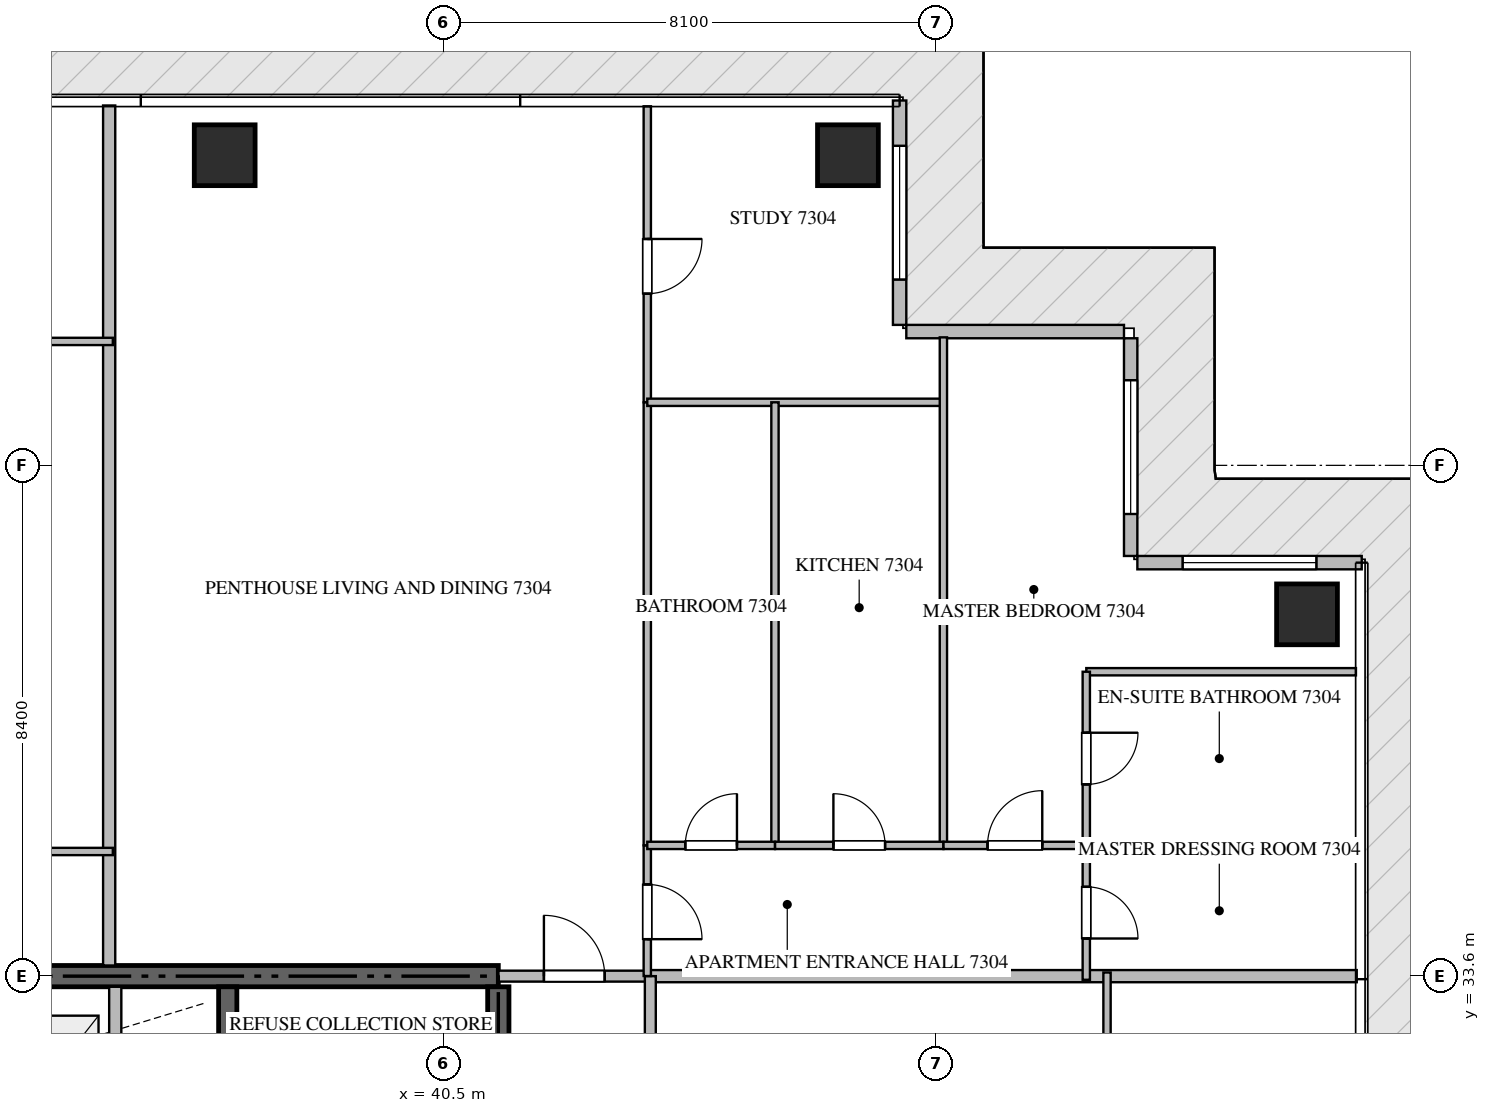
"""IFC4 building model, lengths in metres.
Left out: names, types, materials, properties, quantities, classifications, styles, units other than length and angle.
Written with IfcOpenShell. Run it as: python <this file> out.ifc"""

import sys

from ifc_helpers import new_model, si_unit, direction, frame, frame_2d, origin, origin_2d, place, context, subcontext, project, spatial, rectangle, extrude, source, transform, mapped, element, fill, save


model = new_model("IFC4")
c1 = context("Model", 3, precision=1e-05, world=origin(), true_north=direction((0.0, 1.0)))
c2 = subcontext(c1, "Body", "Model", "MODEL_VIEW")
j1 = project(units=[si_unit("LENGTHUNIT", "METRE"), si_unit("PLANEANGLEUNIT", "RADIAN")], contexts=[c1])
p1 = place(None, origin())
s1 = spatial("IfcSite", under=j1, at=p1, CompositionType="ELEMENT")
p2 = place(p1, origin())
s2 = spatial("IfcBuilding", under=s1, at=p2, CompositionType="ELEMENT")
p3 = place(p2, frame((0.0, 0.0, 293.45)))
s3 = spatial("IfcBuildingStorey", under=s2, at=p3, CompositionType="ELEMENT", Elevation=293.45)
p4 = place(p3, frame((41.4, 33.6, -0.26), z_axis=(0.0, 0.0, 1.0), x_axis=(-1.0, 0.0, 0.0)))
e1 = element("IfcWall", 1, at=p4, inside=s3, PredefinedType="SHEAR", context=c2, shape_type="SweptSolid", body=[
    extrude(rectangle(XDim=18.0, YDim=0.35, at=frame_2d((9.0, 0.0))), origin(), (0.0, 0.0, 1.0), 4.048),
])
p5 = place(p3, frame((41.4, 27.75, -0.26), z_axis=(0.0, 0.0, 1.0), x_axis=(0.0, 1.0, 0.0)))
e2 = element("IfcWall", 2, at=p5, inside=s3, PredefinedType="SHEAR", context=c2, shape_type="SweptSolid", body=[
    extrude(rectangle(XDim=5.675, YDim=0.35, at=frame_2d((2.837, 0.0))), origin(), (0.0, 0.0, 1.0), 4.048),
])
p6 = place(p3, frame((36.95, 27.05, -0.26), z_axis=(0.0, 0.0, 1.0), x_axis=(0.0, 1.0, 0.0)))
e3 = element("IfcWall", 3, at=p6, inside=s3, PredefinedType="SHEAR", context=c2, shape_type="SweptSolid", body=[
    extrude(rectangle(XDim=6.375, YDim=0.3, at=frame_2d((3.188, 0.0))), origin(), (0.0, 0.0, 1.0), 4.048),
])
m1 = source(origin(), c2, "Body", "SweptSolid", [
    extrude(rectangle(XDim=1.0, YDim=1.0, at=origin_2d()), origin(), (0.0, 0.0, 1.0), 4.05),
])
for number, where, z_axis, x_axis in (
    (4, (36.9, 47.1, -0.26), (0.0, 0.0, 1.0), (1.0, 0.0, 0.0)),
    (5, (47.15, 47.1, -0.26), (0.0, 0.0, 1.0), (1.0, 0.0, 0.0)),
    (6, (54.7, 39.55, -0.26), (0.0, 0.0, 1.0), (1.0, 0.0, 0.0)),
):
    element("IfcColumn", number, at=place(p3, frame(where, z_axis=z_axis, x_axis=x_axis)), inside=s3, PredefinedType="COLUMN", context=c2, shape_type="MappedRepresentation", body=[
        mapped(m1, transform((0.0, 0.0, 0.0), scale=1.0)),
    ])
p7 = place(p3, frame((55.6, 40.4, 0.0), z_axis=(0.0, 0.0, 1.0), x_axis=(-1.0, 0.0, 0.0)))
e7 = element("IfcWall", 7, at=p7, inside=s3, PredefinedType="ELEMENTEDWALL", context=c2, shape_type="SweptSolid", body=[
    extrude(rectangle(XDim=3.69, YDim=0.22, at=frame_2d((1.845, 0.0))), origin(), (0.0, 0.0, 1.0), 3.775),
])
p8 = place(p7, frame((0.745, 0.0, 0.65)))
e8 = element("IfcOpeningElement", 8, at=p8, cuts=e7, PredefinedType="OPENING", context=c2, shape_type="SweptSolid", body=[
    extrude(rectangle(XDim=2.2, YDim=2.4, at=frame_2d((1.1, 1.2))), frame((0.0, 0.12, 0.0), z_axis=(0.0, -1.0, 0.0), x_axis=(1.0, 0.0, 0.0)), (0.0, 0.0, 1.0), 0.24),
])
p9 = place(p3, frame((51.8, 40.51, 0.0), z_axis=(0.0, 0.0, 1.0), x_axis=(0.0, 1.0, 0.0)))
e9 = element("IfcWall", 9, at=p9, inside=s3, PredefinedType="ELEMENTEDWALL", context=c2, shape_type="SweptSolid", body=[
    extrude(rectangle(XDim=3.58, YDim=0.22, at=frame_2d((1.79, 0.0))), origin(), (0.0, 0.0, 1.0), 3.775),
])
p10 = place(p9, frame((0.69, 0.0, 0.65)))
e10 = element("IfcOpeningElement", 10, at=p10, cuts=e9, PredefinedType="OPENING", context=c2, shape_type="SweptSolid", body=[
    extrude(rectangle(XDim=2.2, YDim=2.4, at=frame_2d((1.1, 1.2))), frame((0.0, 0.12, 0.0), z_axis=(0.0, -1.0, 0.0), x_axis=(1.0, 0.0, 0.0)), (0.0, 0.0, 1.0), 0.24),
])
p11 = place(p3, frame((51.69, 44.2, 0.0), z_axis=(0.0, 0.0, 1.0), x_axis=(-1.0, 0.0, 0.0)))
e11 = element("IfcWall", 11, at=p11, inside=s3, PredefinedType="ELEMENTEDWALL", context=c2, shape_type="SweptSolid", body=[
    extrude(rectangle(XDim=3.58, YDim=0.22, at=frame_2d((1.79, 0.0))), origin(), (0.0, 0.0, 1.0), 3.775),
])
p12 = place(p3, frame((48.0, 44.31, 0.0), z_axis=(0.0, 0.0, 1.0), x_axis=(0.0, 1.0, 0.0)))
e12 = element("IfcWall", 12, at=p12, inside=s3, PredefinedType="ELEMENTEDWALL", context=c2, shape_type="SweptSolid", body=[
    extrude(rectangle(XDim=3.69, YDim=0.22, at=frame_2d((1.845, 0.0))), origin(), (0.0, 0.0, 1.0), 3.775),
])
p13 = place(p12, frame((0.745, 0.0, 0.65)))
e13 = element("IfcOpeningElement", 13, at=p13, cuts=e12, PredefinedType="OPENING", context=c2, shape_type="SweptSolid", body=[
    extrude(rectangle(XDim=2.2, YDim=2.4, at=frame_2d((1.1, 1.2))), frame((0.0, 0.12, 0.0), z_axis=(0.0, -1.0, 0.0), x_axis=(1.0, 0.0, 0.0)), (0.0, 0.0, 1.0), 0.24),
])
p14 = place(p3, frame((35.1, 30.75, 0.0), z_axis=(0.0, 0.0, 1.0), x_axis=(0.0, 1.0, 0.0)))
e14 = element("IfcWall", 14, at=p14, inside=s3, PredefinedType="STANDARD", context=c2, shape_type="SweptSolid", body=[
    extrude(rectangle(XDim=2.675, YDim=0.2, at=frame_2d((1.337, 0.0))), origin(), (0.0, 0.0, 1.0), 3.79),
])
p15 = place(p3, frame((35.0, 33.775, 0.0), z_axis=(0.0, 0.0, 1.0), x_axis=(0.0, 1.0, 0.0)))
e15 = element("IfcWall", 15, at=p15, inside=s3, PredefinedType="PARTITIONING", context=c2, shape_type="SweptSolid", body=[
    extrude(rectangle(XDim=14.143, YDim=0.2, at=frame_2d((7.072, 0.0))), origin(), (0.0, 0.0, 1.0), 3.79),
])
p16 = place(p3, frame((43.9, 33.6, 0.0), z_axis=(0.0, 0.0, 1.0), x_axis=(1.0, 0.0, 0.0)))
e16 = element("IfcWall", 16, at=p16, inside=s3, PredefinedType="PARTITIONING", context=c2, shape_type="SweptSolid", body=[
    extrude(rectangle(XDim=11.618, YDim=0.2, at=frame_2d((5.809, 0.0))), origin(), (0.0, 0.0, 1.0), 3.79),
])
p17 = place(p3, frame((41.402, 33.6, 0.0), z_axis=(0.0, 0.0, 1.0), x_axis=(1.0, 0.0, 0.0)))
e17 = element("IfcWall", 17, at=p17, inside=s3, PredefinedType="PARTITIONING", context=c2, shape_type="SweptSolid", body=[
    extrude(rectangle(XDim=2.496, YDim=0.18, at=frame_2d((1.248, 0.0))), origin(), (0.0, 0.0, 1.0), 3.79),
])
p18 = place(p17, frame((0.748, 0.0, 0.0)))
e18 = element("IfcOpeningElement", 18, at=p18, cuts=e17, PredefinedType="OPENING", context=c2, shape_type="SweptSolid", body=[
    extrude(rectangle(XDim=1.0, YDim=2.15, at=frame_2d((0.5, 1.075))), frame((0.0, 0.1, 0.0), z_axis=(0.0, -1.0, 0.0), x_axis=(1.0, 0.0, 0.0)), (0.0, 0.0, 1.0), 0.2),
])
p19 = place(p3, frame((43.9, 16.8, 0.0), z_axis=(0.0, 0.0, 1.0), x_axis=(0.0, 1.0, 0.0)))
e19 = element("IfcWall", 19, at=p19, inside=s3, PredefinedType="PARTITIONING", context=c2, shape_type="SweptSolid", body=[
    extrude(rectangle(XDim=16.8, YDim=0.18, at=frame_2d((8.4, 0.0))), origin(), (0.0, 0.0, 1.0), 3.79),
])
p20 = place(p19, frame((1.3, 0.0, 0.0)))
e20 = element("IfcOpeningElement", 20, at=p20, cuts=e19, PredefinedType="OPENING", context=c2, shape_type="SweptSolid", body=[
    extrude(rectangle(XDim=1.0, YDim=2.15, at=frame_2d((0.5, 1.075))), frame((0.0, 0.1, 0.0), z_axis=(0.0, -1.0, 0.0), x_axis=(1.0, 0.0, 0.0)), (0.0, 0.0, 1.0), 0.2),
])
for number, where, z_axis, x_axis in (
    (21, (26.3, 44.038, 0.0), (0.0, 0.0, 1.0), (1.0, 0.0, 0.0)),
    (22, (26.3, 35.65, 0.0), (0.0, 0.0, 1.0), (1.0, 0.0, 0.0)),
):
    element("IfcWall", number, at=place(p3, frame(where, z_axis=z_axis, x_axis=x_axis)), inside=s3, PredefinedType="PARTITIONING", context=c2, shape_type="SweptSolid", body=[
        extrude(rectangle(XDim=8.76, YDim=0.12, at=frame_2d((4.38, 0.0))), origin(), (0.0, 0.0, 1.0), 3.79),
    ])
p21 = place(p3, frame((43.85, 35.75, 0.0), z_axis=(0.0, 0.0, 1.0), x_axis=(0.0, -1.0, 0.0)))
e23 = element("IfcWall", 23, at=p21, inside=s3, PredefinedType="PARTITIONING", context=c2, shape_type="SweptSolid", body=[
    extrude(rectangle(XDim=2.148, YDim=0.12, at=frame_2d((1.074, 0.0))), origin(), (0.0, 0.0, 1.0), 3.79),
])
p22 = place(p21, frame((0.642, 0.0, 0.0)))
e24 = element("IfcOpeningElement", 24, at=p22, cuts=e23, PredefinedType="OPENING", context=c2, shape_type="SweptSolid", body=[
    extrude(rectangle(XDim=0.9, YDim=2.1, at=frame_2d((0.45, 1.05))), frame((0.0, 0.07, 0.0), z_axis=(0.0, -1.0, 0.0), x_axis=(1.0, 0.0, 0.0)), (0.0, 0.0, 1.0), 0.14),
])
p23 = place(p3, frame((43.85, 47.905, 0.0), z_axis=(0.0, 0.0, 1.0), x_axis=(0.0, -1.0, 0.0)))
e25 = element("IfcWall", 25, at=p23, inside=s3, PredefinedType="PARTITIONING", context=c2, shape_type="SweptSolid", body=[
    extrude(rectangle(XDim=4.868, YDim=0.12, at=frame_2d((2.434, 0.0))), origin(), (0.0, 0.0, 1.0), 3.79),
])
p24 = place(p23, frame((2.182, 0.0, 0.0)))
e26 = element("IfcOpeningElement", 26, at=p24, cuts=e25, PredefinedType="OPENING", context=c2, shape_type="SweptSolid", body=[
    extrude(rectangle(XDim=0.9, YDim=2.1, at=frame_2d((0.45, 1.05))), frame((0.0, 0.07, 0.0), z_axis=(0.0, -1.0, 0.0), x_axis=(1.0, 0.0, 0.0)), (0.0, 0.0, 1.0), 0.14),
])
p25 = place(p3, frame((43.85, 43.035, 0.0), z_axis=(0.0, 0.0, 1.0), x_axis=(0.0, -1.0, 0.0)))
e27 = element("IfcWall", 27, at=p25, inside=s3, PredefinedType="PARTITIONING", context=c2, shape_type="SweptSolid", body=[
    extrude(rectangle(XDim=7.283, YDim=0.12, at=frame_2d((3.642, 0.0))), origin(), (0.0, 0.0, 1.0), 3.79),
])
p26 = place(p3, frame((43.85, 43.037, 0.0), z_axis=(0.0, 0.0, 1.0), x_axis=(1.0, 0.0, 0.0)))
e28 = element("IfcWall", 28, at=p26, inside=s3, PredefinedType="PARTITIONING", context=c2, shape_type="SweptSolid", body=[
    extrude(rectangle(XDim=4.87, YDim=0.12, at=frame_2d((2.435, 0.0))), origin(), (0.0, 0.0, 1.0), 3.79),
])
p27 = place(p3, frame((48.72, 44.105, 0.0), z_axis=(0.0, 0.0, 1.0), x_axis=(0.0, -1.0, 0.0)))
e29 = element("IfcWall", 29, at=p27, inside=s3, PredefinedType="PARTITIONING", context=c2, shape_type="SweptSolid", body=[
    extrude(rectangle(XDim=8.355, YDim=0.12, at=frame_2d((4.177, 0.0))), origin(), (0.0, 0.0, 1.0), 3.79),
])
p28 = place(p3, frame((45.95, 43.037, 0.0), z_axis=(0.0, 0.0, 1.0), x_axis=(0.0, -1.0, 0.0)))
e30 = element("IfcWall", 30, at=p28, inside=s3, PredefinedType="PARTITIONING", context=c2, shape_type="SweptSolid", body=[
    extrude(rectangle(XDim=7.287, YDim=0.12, at=frame_2d((3.644, 0.0))), origin(), (0.0, 0.0, 1.0), 3.79),
])
p29 = place(p3, frame((43.85, 35.75, 0.0), z_axis=(0.0, 0.0, 1.0), x_axis=(1.0, 0.0, 0.0)))
e31 = element("IfcWall", 31, at=p29, inside=s3, PredefinedType="PARTITIONING", context=c2, shape_type="SweptSolid", body=[
    extrude(rectangle(XDim=2.1, YDim=0.12, at=frame_2d((1.05, 0.0))), origin(), (0.0, 0.0, 1.0), 3.79),
])
p30 = place(p29, frame((0.625, 0.0, 0.0)))
e32 = element("IfcOpeningElement", 32, at=p30, cuts=e31, PredefinedType="OPENING", context=c2, shape_type="SweptSolid", body=[
    extrude(rectangle(XDim=0.85, YDim=2.1, at=frame_2d((0.425, 1.05))), frame((0.0, 0.07, 0.0), z_axis=(0.0, -1.0, 0.0), x_axis=(1.0, 0.0, 0.0)), (0.0, 0.0, 1.0), 0.14),
])
p31 = place(p3, frame((45.952, 35.75, 0.0), z_axis=(0.0, 0.0, 1.0), x_axis=(1.0, 0.0, 0.0)))
e33 = element("IfcWall", 33, at=p31, inside=s3, PredefinedType="PARTITIONING", context=c2, shape_type="SweptSolid", body=[
    extrude(rectangle(XDim=2.768, YDim=0.12, at=frame_2d((1.384, 0.0))), origin(), (0.0, 0.0, 1.0), 3.79),
])
p32 = place(p31, frame((0.959, 0.0, 0.0)))
e34 = element("IfcOpeningElement", 34, at=p32, cuts=e33, PredefinedType="OPENING", context=c2, shape_type="SweptSolid", body=[
    extrude(rectangle(XDim=0.85, YDim=2.1, at=frame_2d((0.425, 1.05))), frame((0.0, 0.07, 0.0), z_axis=(0.0, -1.0, 0.0), x_axis=(1.0, 0.0, 0.0)), (0.0, 0.0, 1.0), 0.14),
])
p33 = place(p3, frame((48.722, 35.75, 0.0), z_axis=(0.0, 0.0, 1.0), x_axis=(1.0, 0.0, 0.0)))
e35 = element("IfcWall", 35, at=p33, inside=s3, PredefinedType="PARTITIONING", context=c2, shape_type="SweptSolid", body=[
    extrude(rectangle(XDim=2.348, YDim=0.12, at=frame_2d((1.174, 0.0))), origin(), (0.0, 0.0, 1.0), 3.79),
])
p34 = place(p33, frame((0.724, 0.0, 0.0)))
e36 = element("IfcOpeningElement", 36, at=p34, cuts=e35, PredefinedType="OPENING", context=c2, shape_type="SweptSolid", body=[
    extrude(rectangle(XDim=0.9, YDim=2.1, at=frame_2d((0.45, 1.05))), frame((0.0, 0.07, 0.0), z_axis=(0.0, -1.0, 0.0), x_axis=(1.0, 0.0, 0.0)), (0.0, 0.0, 1.0), 0.14),
])
p35 = place(p3, frame((51.07, 38.606, 0.0), z_axis=(0.0, 0.0, 1.0), x_axis=(1.0, 0.0, 0.0)))
e37 = element("IfcWall", 37, at=p35, inside=s3, PredefinedType="PARTITIONING", context=c2, shape_type="SweptSolid", body=[
    extrude(rectangle(XDim=4.435, YDim=0.12, at=frame_2d((2.217, 0.0))), origin(), (0.0, 0.0, 1.0), 3.79),
])
p36 = place(p3, frame((51.072, 35.75, 0.0), z_axis=(0.0, 0.0, 1.0), x_axis=(1.0, 0.0, 0.0)))
e38 = element("IfcWall", 38, at=p36, inside=s3, PredefinedType="PARTITIONING", context=c2, shape_type="SweptSolid", body=[
    extrude(rectangle(XDim=4.433, YDim=0.12, at=frame_2d((2.216, 0.0))), origin(), (0.0, 0.0, 1.0), 3.79),
])
p37 = place(p3, frame((51.07, 38.606, 0.0), z_axis=(0.0, 0.0, 1.0), x_axis=(0.0, -1.0, 0.0)))
e39 = element("IfcWall", 39, at=p37, inside=s3, PredefinedType="PARTITIONING", context=c2, shape_type="SweptSolid", body=[
    extrude(rectangle(XDim=2.856, YDim=0.12, at=frame_2d((1.428, 0.0))), origin(), (0.0, 0.0, 1.0), 3.79),
])
p38 = place(p37, frame((1.003, 0.0, 0.0)))
e40 = element("IfcOpeningElement", 40, at=p38, cuts=e39, PredefinedType="OPENING", context=c2, shape_type="SweptSolid", body=[
    extrude(rectangle(XDim=0.85, YDim=2.1, at=frame_2d((0.425, 1.05))), frame((0.0, 0.07, 0.0), z_axis=(0.0, -1.0, 0.0), x_axis=(1.0, 0.0, 0.0)), (0.0, 0.0, 1.0), 0.14),
])
p39 = place(p3, frame((51.07, 35.748, 0.0), z_axis=(0.0, 0.0, 1.0), x_axis=(0.0, -1.0, 0.0)))
e41 = element("IfcWall", 41, at=p39, inside=s3, PredefinedType="PARTITIONING", context=c2, shape_type="SweptSolid", body=[
    extrude(rectangle(XDim=2.208, YDim=0.12, at=frame_2d((1.104, 0.0))), origin(), (0.0, 0.0, 1.0), 3.79),
])
p40 = place(p39, frame((0.679, 0.0, 0.0)))
e42 = element("IfcOpeningElement", 42, at=p40, cuts=e41, PredefinedType="OPENING", context=c2, shape_type="SweptSolid", body=[
    extrude(rectangle(XDim=0.85, YDim=2.1, at=frame_2d((0.425, 1.05))), frame((0.0, 0.07, 0.0), z_axis=(0.0, -1.0, 0.0), x_axis=(1.0, 0.0, 0.0)), (0.0, 0.0, 1.0), 0.14),
])
p41 = place(p3, frame((51.411, 23.18, 0.0), z_axis=(0.0, 0.0, 1.0), x_axis=(0.0, 1.0, 0.0)))
e43 = element("IfcWall", 43, at=p41, inside=s3, PredefinedType="PARTITIONING", context=c2, shape_type="SweptSolid", body=[
    extrude(rectangle(XDim=10.48, YDim=0.12, at=frame_2d((5.24, 0.0))), origin(), (0.0, 0.0, 1.0), 3.79),
])
m2 = source(origin(), c2, "Body", "SweptSolid", [
    extrude(rectangle(XDim=2.2, YDim=2.4, at=frame_2d((1.1, 1.2))), frame((0.0, 0.03, 0.0), z_axis=(0.0, -1.0, 0.0), x_axis=(1.0, 0.0, 0.0)), (0.0, 0.0, 1.0), 0.06),
])
p42 = place(p8, origin())
e44 = element("IfcWindow", 44, at=p42, inside=s3, PartitioningType="SINGLE_PANEL", PredefinedType="WINDOW", context=c2, shape_type="MappedRepresentation", body=[
    mapped(m2, transform((0.0, 0.0, 0.0), scale=1.0)),
])
fill(e8, e44)
p43 = place(p10, origin())
e45 = element("IfcWindow", 45, at=p43, inside=s3, PartitioningType="SINGLE_PANEL", PredefinedType="WINDOW", context=c2, shape_type="MappedRepresentation", body=[
    mapped(m2, transform((0.0, 0.0, 0.0), scale=1.0)),
])
fill(e10, e45)
p44 = place(p13, origin())
e46 = element("IfcWindow", 46, at=p44, inside=s3, PartitioningType="SINGLE_PANEL", PredefinedType="WINDOW", context=c2, shape_type="MappedRepresentation", body=[
    mapped(m2, transform((0.0, 0.0, 0.0), scale=1.0)),
])
fill(e13, e46)
m3 = source(origin(), c2, "Body", "SweptSolid", [
    extrude(rectangle(XDim=1.0, YDim=2.15, at=frame_2d((0.5, 1.075))), frame((0.0, 0.025, 0.0), z_axis=(0.0, -1.0, 0.0), x_axis=(1.0, 0.0, 0.0)), (0.0, 0.0, 1.0), 0.05),
])
p45 = place(p18, origin())
e47 = element("IfcDoor", 47, at=p45, inside=s3, OperationType="SINGLE_SWING_LEFT", PredefinedType="DOOR", context=c2, shape_type="MappedRepresentation", body=[
    mapped(m3, transform((0.0, 0.0, 0.0), scale=1.0)),
])
fill(e18, e47)
m4 = source(origin(), c2, "Body", "SweptSolid", [
    extrude(rectangle(XDim=0.9, YDim=2.1, at=frame_2d((0.45, 1.05))), frame((0.0, 0.025, 0.0), z_axis=(0.0, -1.0, 0.0), x_axis=(1.0, 0.0, 0.0)), (0.0, 0.0, 1.0), 0.05),
])
p46 = place(p22, origin())
e48 = element("IfcDoor", 48, at=p46, inside=s3, OperationType="SINGLE_SWING_RIGHT", PredefinedType="DOOR", context=c2, shape_type="MappedRepresentation", body=[
    mapped(m4, transform((0.0, 0.0, 0.0), scale=1.0)),
])
fill(e24, e48)
p47 = place(p24, origin())
e49 = element("IfcDoor", 49, at=p47, inside=s3, OperationType="SINGLE_SWING_LEFT", PredefinedType="DOOR", context=c2, shape_type="MappedRepresentation", body=[
    mapped(m4, transform((0.0, 0.0, 0.0), scale=1.0)),
])
fill(e26, e49)
m5 = source(origin(), c2, "Body", "SweptSolid", [
    extrude(rectangle(XDim=0.85, YDim=2.1, at=frame_2d((0.425, 1.05))), frame((0.0, 0.025, 0.0), z_axis=(0.0, -1.0, 0.0), x_axis=(1.0, 0.0, 0.0)), (0.0, 0.0, 1.0), 0.05),
])
p48 = place(p30, origin())
e50 = element("IfcDoor", 50, at=p48, inside=s3, OperationType="SINGLE_SWING_RIGHT", PredefinedType="DOOR", context=c2, shape_type="MappedRepresentation", body=[
    mapped(m5, transform((0.0, 0.0, 0.0), scale=1.0)),
])
fill(e32, e50)
p49 = place(p32, origin())
e51 = element("IfcDoor", 51, at=p49, inside=s3, OperationType="SINGLE_SWING_LEFT", PredefinedType="DOOR", context=c2, shape_type="MappedRepresentation", body=[
    mapped(m5, transform((0.0, 0.0, 0.0), scale=1.0)),
])
fill(e34, e51)
p50 = place(p34, origin())
e52 = element("IfcDoor", 52, at=p50, inside=s3, OperationType="SINGLE_SWING_RIGHT", PredefinedType="DOOR", context=c2, shape_type="MappedRepresentation", body=[
    mapped(m4, transform((0.0, 0.0, 0.0), scale=1.0)),
])
fill(e36, e52)
p51 = place(p38, origin())
e53 = element("IfcDoor", 53, at=p51, inside=s3, OperationType="SINGLE_SWING_LEFT", PredefinedType="DOOR", context=c2, shape_type="MappedRepresentation", body=[
    mapped(m5, transform((0.0, 0.0, 0.0), scale=1.0)),
])
fill(e40, e53)
p52 = place(p40, origin())
e54 = element("IfcDoor", 54, at=p52, inside=s3, OperationType="SINGLE_SWING_RIGHT", PredefinedType="DOOR", context=c2, shape_type="MappedRepresentation", body=[
    mapped(m5, transform((0.0, 0.0, 0.0), scale=1.0)),
])
fill(e42, e54)
save(model, sys.argv[1])
